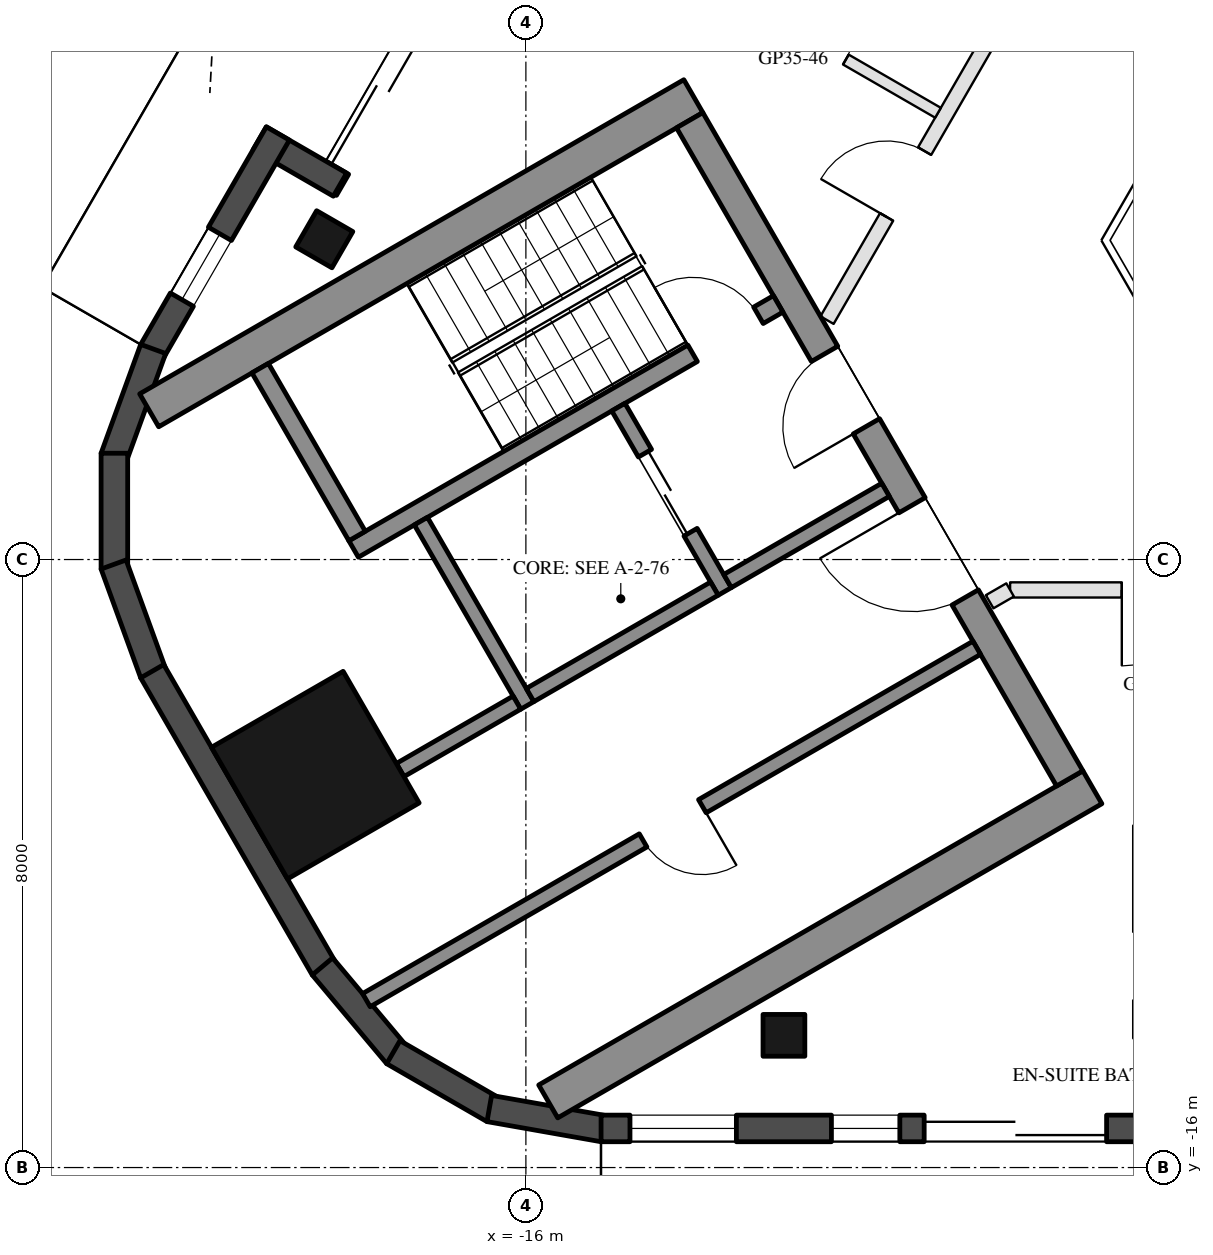
"""IFC4 building model, lengths in metres.
Left out: names, types, materials, properties, quantities, classifications, styles, units other than length and angle.
Written with IfcOpenShell. Run it as: python <this file> out.ifc"""

import sys

from ifc_helpers import new_model, si_unit, direction, frame, frame_2d, origin, origin_2d, place, context, subcontext, project, spatial, rectangle, hollow_rectangle, extrude, boolean, halfspace, element, fill, save


model = new_model("IFC4")
c1 = context("Model", 3, precision=1e-05, world=origin(), true_north=direction((0.0, 1.0)))
c2 = subcontext(c1, "Body", "Model", "MODEL_VIEW")
j1 = project(units=[si_unit("LENGTHUNIT", "METRE"), si_unit("PLANEANGLEUNIT", "RADIAN")], contexts=[c1])
p1 = place(None, origin())
s1 = spatial("IfcSite", under=j1, at=p1, CompositionType="ELEMENT")
p2 = place(p1, origin())
s2 = spatial("IfcBuilding", under=s1, at=p2, CompositionType="ELEMENT")
p3 = place(p2, frame((0.0, 0.0, 324.4)))
s3 = spatial("IfcBuildingStorey", under=s2, at=p3, CompositionType="ELEMENT", Elevation=324.4)
for number, where, z_axis, x_axis in (
    (1, (-12.605, -14.26, 0.0), (0.0, 0.0, 1.0), (-1.0, 0.0, 0.0)),
    (2, (-18.652, -3.786, 0.0), (0.0, 0.0, 1.0), (0.5, 0.866, 0.0)),
):
    element("IfcColumn", number, at=place(p3, frame(where, z_axis=z_axis, x_axis=x_axis)), inside=s3, PredefinedType="COLUMN", context=c2, shape_type="SweptSolid", body=[
        boolean("DIFFERENCE", boolean("DIFFERENCE", extrude(hollow_rectangle(XDim=0.55, YDim=0.55, WallThickness=0.025, at=origin_2d()), origin(), (0.0, 0.0, 1.0), 3.7), halfspace(frame((0.0, 0.0, 0.04), z_axis=(0.0, 0.0, 1.0), x_axis=(1.0, 0.0, 0.0)), True)), halfspace(frame((0.0, 0.0, 3.66), z_axis=(0.0, 0.0, 1.0), x_axis=(1.0, 0.0, 0.0)), False)),
    ])
p4 = place(p3, frame((-18.77, -10.837, 0.0), z_axis=(0.0, 0.0, 1.0), x_axis=(-0.5, 0.866025403784, 0.0)))
e3 = element("IfcColumn", 3, at=p4, inside=s3, PredefinedType="COLUMN", context=c2, shape_type="SweptSolid", body=[
    boolean("DIFFERENCE", boolean("DIFFERENCE", extrude(hollow_rectangle(XDim=2.0, YDim=2.0, WallThickness=0.05, at=origin_2d()), origin(), (0.0, 0.0, 1.0), 3.7), halfspace(frame((0.0, 0.0, 0.113), z_axis=(0.0, 0.0, 1.0), x_axis=(1.0, 0.0, 0.0)), True)), halfspace(frame((0.0, 0.0, 3.587), z_axis=(0.0, 0.0, 1.0), x_axis=(1.0, 0.0, 0.0)), False)),
])
p5 = place(p3, frame((-16.073, 1.333, 0.0), z_axis=(0.0, 0.0, 1.0), x_axis=(-0.499999159329, -0.866025889145, 0.0)))
e4 = element("IfcWall", 4, at=p5, inside=s3, PredefinedType="SOLIDWALL", context=c2, shape_type="SweptSolid", body=[
    extrude(rectangle(XDim=5.143, YDim=0.35, at=frame_2d((2.571, 0.0))), origin(), (0.0, 0.0, 1.0), 3.55),
])
p6 = place(p5, frame((2.422, 0.0, 0.0)))
e5 = element("IfcOpeningElement", 5, at=p6, cuts=e4, PredefinedType="OPENING", context=c2, shape_type="SweptSolid", body=[
    extrude(rectangle(XDim=2.4, YDim=2.4, at=frame_2d((1.2, 1.2))), frame((0.0, 0.185, 0.0), z_axis=(0.0, -1.0, 0.0), x_axis=(1.0, 0.0, 0.0)), (0.0, 0.0, 1.0), 0.37),
])
p7 = place(p5, frame((0.32, 0.0, 0.3)))
e6 = element("IfcOpeningElement", 6, at=p7, cuts=e4, PredefinedType="OPENING", context=c2, shape_type="SweptSolid", body=[
    extrude(rectangle(XDim=1.8, YDim=2.65, at=frame_2d((0.9, 1.325))), frame((0.0, 0.185, 0.0), z_axis=(0.0, -1.0, 0.0), x_axis=(1.0, 0.0, 0.0)), (0.0, 0.0, 1.0), 0.37),
])
p8 = place(p3, frame((-18.446, -3.068, 0.0), z_axis=(0.0, 0.0, 1.0), x_axis=(-0.866005645448, 0.500034220881, 0.0)))
e7 = element("IfcWall", 7, at=p8, inside=s3, PredefinedType="SOLIDWALL", context=c2, shape_type="SweptSolid", body=[
    extrude(rectangle(XDim=1.22, YDim=0.35, at=frame_2d((0.61, 0.0))), origin(), (0.0, 0.0, 1.0), 3.55),
])
p9 = place(p3, frame((-19.263, -2.394, 0.0), z_axis=(0.0, 0.0, 1.0), x_axis=(-0.500022895934, -0.866012184407, 0.0)))
e8 = element("IfcWall", 8, at=p9, inside=s3, PredefinedType="SOLIDWALL", context=c2, shape_type="SweptSolid", body=[
    extrude(rectangle(XDim=3.306, YDim=0.35, at=frame_2d((1.653, 0.0))), origin(), (0.0, 0.0, 1.0), 3.55),
])
p10 = place(p9, frame((1.525, 0.0, 0.3)))
e9 = element("IfcOpeningElement", 9, at=p10, cuts=e8, PredefinedType="OPENING", context=c2, shape_type="SweptSolid", body=[
    extrude(rectangle(XDim=1.0, YDim=2.65, at=frame_2d((0.5, 1.325))), frame((0.0, 0.185, 0.0), z_axis=(0.0, -1.0, 0.0), x_axis=(1.0, 0.0, 0.0)), (0.0, 0.0, 1.0), 0.37),
])
for number, where, z_axis, x_axis in (
    (10, (-20.903, -5.229, 0.0), (0.0, 0.0, 1.0), (-0.342, -0.94, 0.0)),
    (11, (-21.414, -6.602, 0.0), (0.0, 0.0, 1.0), (0.0, -1.0, 0.0)),
    (12, (-21.425, -8.065, 0.0), (0.0, 0.0, 1.0), (0.342, -0.94, 0.0)),
):
    element("IfcWall", number, at=place(p3, frame(where, z_axis=z_axis, x_axis=x_axis)), inside=s3, PredefinedType="SOLIDWALL", context=c2, shape_type="SweptSolid", body=[
        extrude(rectangle(XDim=1.524, YDim=0.35, at=frame_2d((0.762, 0.0))), origin(), (0.0, 0.0, 1.0), 3.55),
    ])
p11 = place(p3, frame((-20.916, -9.47, 0.0), z_axis=(0.0, 0.0, 1.0), x_axis=(0.500042384281, -0.866000931825, 0.0)))
e13 = element("IfcWall", 13, at=p11, inside=s3, PredefinedType="SOLIDWALL", context=c2, shape_type="SweptSolid", body=[
    extrude(rectangle(XDim=4.514, YDim=0.35, at=frame_2d((2.257, 0.0))), origin(), (0.0, 0.0, 1.0), 3.55),
])
p12 = place(p3, frame((-18.677, -13.354, 0.0), z_axis=(0.0, 0.0, 1.0), x_axis=(0.642812493629, -0.766023562323, 0.0)))
e14 = element("IfcWall", 14, at=p12, inside=s3, PredefinedType="SOLIDWALL", context=c2, shape_type="SweptSolid", body=[
    extrude(rectangle(XDim=1.524, YDim=0.35, at=frame_2d((0.762, 0.0))), origin(), (0.0, 0.0, 1.0), 3.55),
])
for number, where, z_axis, x_axis in (
    (15, (-17.744, -14.482, 0.0), (0.0, 0.0, 1.0), (0.866, -0.5, 0.0)),
    (16, (-16.481, -15.223, 0.0), (0.0, 0.0, 1.0), (0.985, -0.174, 0.0)),
):
    element("IfcWall", number, at=place(p3, frame(where, z_axis=z_axis, x_axis=x_axis)), inside=s3, PredefinedType="SOLIDWALL", context=c2, shape_type="SweptSolid", body=[
        extrude(rectangle(XDim=1.524, YDim=0.35, at=frame_2d((0.762, 0.0))), origin(), (0.0, 0.0, 1.0), 3.55),
    ])
p13 = place(p3, frame((-15.011, -15.485, 0.0), z_axis=(0.0, 0.0, 1.0), x_axis=(1.0, 0.0, 0.0)))
e17 = element("IfcWall", 17, at=p13, inside=s3, PredefinedType="SOLIDWALL", context=c2, shape_type="SweptSolid", body=[
    extrude(rectangle(XDim=9.608, YDim=0.35, at=frame_2d((4.804, 0.0))), origin(), (0.0, 0.0, 1.0), 3.55),
])
p14 = place(p13, frame((0.38, 0.0, 0.3)))
e18 = element("IfcOpeningElement", 18, at=p14, cuts=e17, PredefinedType="OPENING", context=c2, shape_type="SweptSolid", body=[
    extrude(rectangle(XDim=1.4, YDim=2.65, at=frame_2d((0.7, 1.325))), frame((0.0, 0.185, 0.0), z_axis=(0.0, -1.0, 0.0), x_axis=(1.0, 0.0, 0.0)), (0.0, 0.0, 1.0), 0.37),
])
p15 = place(p13, frame((4.251, 0.0, 0.0)))
e19 = element("IfcOpeningElement", 19, at=p15, cuts=e17, PredefinedType="OPENING", context=c2, shape_type="SweptSolid", body=[
    extrude(rectangle(XDim=2.4, YDim=2.4, at=frame_2d((1.2, 1.2))), frame((0.0, 0.185, 0.0), z_axis=(0.0, -1.0, 0.0), x_axis=(1.0, 0.0, 0.0)), (0.0, 0.0, 1.0), 0.37),
])
p16 = place(p13, frame((3.031, 0.0, 0.3)))
e20 = element("IfcOpeningElement", 20, at=p16, cuts=e17, PredefinedType="OPENING", context=c2, shape_type="SweptSolid", body=[
    extrude(rectangle(XDim=0.9, YDim=2.65, at=frame_2d((0.45, 1.325))), frame((0.0, 0.185, 0.0), z_axis=(0.0, -1.0, 0.0), x_axis=(1.0, 0.0, 0.0)), (0.0, 0.0, 1.0), 0.37),
])
for number, where, z_axis, x_axis in (
    (21, (-13.797, -1.903, 0.0), (0.0, 0.0, 1.0), (-0.866, -0.5, 0.0)),
    (22, (-8.547, -10.997, 0.0), (0.0, 0.0, 1.0), (-0.866, -0.5, 0.0)),
):
    element("IfcWall", number, at=place(p3, frame(where, z_axis=z_axis, x_axis=x_axis)), inside=s3, PredefinedType="SHEAR", context=c2, shape_type="SweptSolid", body=[
        extrude(rectangle(XDim=8.267, YDim=0.5, at=frame_2d((4.134, 0.0))), origin(), (0.0, 0.0, 1.0), 3.5),
    ])
p17 = place(p3, frame((-13.845, -2.22, 0.0), z_axis=(0.0, 0.0, 1.0), x_axis=(0.500004234368, -0.866022959057, 0.0)))
e23 = element("IfcWall", 23, at=p17, inside=s3, PredefinedType="SHEAR", context=c2, shape_type="SweptSolid", body=[
    extrude(rectangle(XDim=10.0, YDim=0.4, at=frame_2d((5.0, 0.0))), origin(), (0.0, 0.0, 1.0), 3.5),
])
p18 = place(p17, frame((3.55, 0.0, 0.0)))
e24 = element("IfcOpeningElement", 24, at=p18, cuts=e23, PredefinedType="OPENING", context=c2, shape_type="SweptSolid", body=[
    extrude(rectangle(XDim=1.1, YDim=2.1, at=frame_2d((0.55, 1.05))), frame((0.0, 0.21, 0.0), z_axis=(0.0, -1.0, 0.0), x_axis=(1.0, 0.0, 0.0)), (0.0, 0.0, 1.0), 0.42),
])
p19 = place(p17, frame((5.85, 0.0, 0.0)))
e25 = element("IfcOpeningElement", 25, at=p19, cuts=e23, PredefinedType="OPENING", context=c2, shape_type="SweptSolid", body=[
    extrude(rectangle(XDim=1.4, YDim=2.1, at=frame_2d((0.7, 1.05))), frame((0.0, 0.21, 0.0), z_axis=(0.0, -1.0, 0.0), x_axis=(1.0, 0.0, 0.0)), (0.0, 0.0, 1.0), 0.42),
])
p20 = place(p3, frame((-12.681, -4.636, 0.0), z_axis=(0.0, 0.0, 1.0), x_axis=(-0.866021702275, -0.500006411147, 0.0)))
e26 = element("IfcWall", 26, at=p20, inside=s3, PredefinedType="SHEAR", context=c2, shape_type="SweptSolid", body=[
    extrude(rectangle(XDim=6.45, YDim=0.25, at=frame_2d((3.225, 0.0))), origin(), (0.0, 0.0, 1.0), 3.5),
])
p21 = place(p20, frame((0.3, 0.0, 0.0)))
e27 = element("IfcOpeningElement", 27, at=p21, cuts=e26, PredefinedType="OPENING", context=c2, shape_type="SweptSolid", body=[
    extrude(rectangle(XDim=1.0, YDim=2.1, at=frame_2d((0.5, 1.05))), frame((0.0, 0.135, 0.0), z_axis=(0.0, -1.0, 0.0), x_axis=(1.0, 0.0, 0.0)), (0.0, 0.0, 1.0), 0.27),
])
p22 = place(p3, frame((-19.496, -5.482, 0.0), z_axis=(0.0, 0.0, 1.0), x_axis=(0.499990435942, -0.866030925526, 0.0)))
e28 = element("IfcWall", 28, at=p22, inside=s3, PredefinedType="SHEAR", context=c2, shape_type="SweptSolid", body=[
    extrude(rectangle(XDim=2.55, YDim=0.25, at=frame_2d((1.275, 0.0))), origin(), (0.0, 0.0, 1.0), 3.5),
])
p23 = place(p3, frame((-17.381, -7.495, 0.0), z_axis=(0.0, 0.0, 1.0), x_axis=(0.500011755427, -0.866018616679, 0.0)))
e29 = element("IfcWall", 29, at=p23, inside=s3, PredefinedType="SHEAR", context=c2, shape_type="SweptSolid", body=[
    extrude(rectangle(XDim=2.8, YDim=0.2, at=frame_2d((1.4, 0.0))), origin(), (0.0, 0.0, 1.0), 3.5),
])
p24 = place(p3, frame((-14.783, -5.995, 0.0), z_axis=(0.0, 0.0, 1.0), x_axis=(0.49994636267, -0.866056369097, 0.0)))
e30 = element("IfcWall", 30, at=p24, inside=s3, PredefinedType="SHEAR", context=c2, shape_type="SweptSolid", body=[
    extrude(rectangle(XDim=2.8, YDim=0.2, at=frame_2d((1.4, 0.0))), origin(), (0.0, 0.0, 1.0), 3.5),
])
p25 = place(p24, frame((0.7, 0.0, 0.0)))
e31 = element("IfcOpeningElement", 31, at=p25, cuts=e30, PredefinedType="OPENING", context=c2, shape_type="SweptSolid", body=[
    extrude(rectangle(XDim=1.2, YDim=2.1, at=frame_2d((0.6, 1.05))), frame((0.0, 0.11, 0.0), z_axis=(0.0, -1.0, 0.0), x_axis=(1.0, 0.0, 0.0)), (0.0, 0.0, 1.0), 0.22),
])
p26 = place(p3, frame((-13.52, -8.383, 0.0), z_axis=(0.0, 0.0, 1.0), x_axis=(-0.866034573852, -0.49998411664, 0.0)))
e32 = element("IfcWall", 32, at=p26, inside=s3, PredefinedType="SHEAR", context=c2, shape_type="SweptSolid", body=[
    extrude(rectangle(XDim=2.8, YDim=0.2, at=frame_2d((1.4, 0.0))), origin(), (0.0, 0.0, 1.0), 3.5),
])
p27 = place(p3, frame((-11.268, -7.083, 0.0), z_axis=(0.0, 0.0, 1.0), x_axis=(-0.866050077142, -0.499957262057, 0.0)))
e33 = element("IfcWall", 33, at=p27, inside=s3, PredefinedType="SHEAR", context=c2, shape_type="SweptSolid", body=[
    extrude(rectangle(XDim=2.4, YDim=0.2, at=frame_2d((1.2, 0.0))), origin(), (0.0, 0.0, 1.0), 3.5),
])
p28 = place(p3, frame((-10.068, -9.162, 0.0), z_axis=(0.0, 0.0, 1.0), x_axis=(-0.866027741594, -0.499995950774, 0.0)))
e34 = element("IfcWall", 34, at=p28, inside=s3, PredefinedType="SHEAR", context=c2, shape_type="SweptSolid", body=[
    extrude(rectangle(XDim=9.272, YDim=0.2, at=frame_2d((4.636, 0.0))), origin(), (0.0, 0.0, 1.0), 3.5),
])
p29 = place(p28, frame((4.169, 0.0, 0.0)))
e35 = element("IfcOpeningElement", 35, at=p29, cuts=e34, PredefinedType="OPENING", context=c2, shape_type="SweptSolid", body=[
    extrude(rectangle(XDim=0.9, YDim=2.1, at=frame_2d((0.45, 1.05))), frame((0.0, 0.11, 0.0), z_axis=(0.0, -1.0, 0.0), x_axis=(1.0, 0.0, 0.0)), (0.0, 0.0, 1.0), 0.22),
])
p30 = place(p3, frame((-16.118, -9.883, 0.0), z_axis=(0.0, 0.0, 1.0), x_axis=(-0.86600680221, -0.500032217487, 0.0)))
e36 = element("IfcWall", 36, at=p30, inside=s3, PredefinedType="SHEAR", context=c2, shape_type="SweptSolid", body=[
    extrude(rectangle(XDim=1.774, YDim=0.2, at=frame_2d((0.887, 0.0))), origin(), (0.0, 0.0, 1.0), 3.5),
])
p31 = place(p3, frame((-5.69, -8.4, 0.0), z_axis=(0.0, 0.0, 1.0), x_axis=(-1.0, 0.0, 0.0)))
e37 = element("IfcWall", 37, at=p31, inside=s3, PredefinedType="PARTITIONING", context=c2, shape_type="SweptSolid", body=[
    extrude(rectangle(XDim=3.939, YDim=0.2, at=frame_2d((1.969, 0.0))), origin(), (0.0, 0.0, 1.0), 3.15),
])
p32 = place(p31, frame((1.469, 0.0, 0.0)))
e38 = element("IfcOpeningElement", 38, at=p32, cuts=e37, PredefinedType="OPENING", context=c2, shape_type="SweptSolid", body=[
    extrude(rectangle(XDim=1.0, YDim=2.1, at=frame_2d((0.5, 1.05))), frame((0.0, 0.11, 0.0), z_axis=(0.0, -1.0, 0.0), x_axis=(1.0, 0.0, 0.0)), (0.0, 0.0, 1.0), 0.22),
])
p33 = place(p3, frame((-9.629, -8.4, 0.0), z_axis=(0.0, 0.0, 1.0), x_axis=(-0.865963302823, -0.500107546598, 0.0)))
e39 = element("IfcWall", 39, at=p33, inside=s3, PredefinedType="PARTITIONING", context=c2, shape_type="SweptSolid", body=[
    extrude(rectangle(XDim=0.311, YDim=0.2, at=frame_2d((0.156, 0.0))), origin(), (0.0, 0.0, 1.0), 3.55),
])
p34 = place(p3, frame((-12.038, -4.85, 0.0), z_axis=(0.0, 0.0, 1.0), x_axis=(0.500003693016, 0.86602327161, 0.0)))
e40 = element("IfcWall", 40, at=p34, inside=s3, PredefinedType="PARTITIONING", context=c2, shape_type="SweptSolid", body=[
    extrude(rectangle(XDim=5.035, YDim=0.2, at=frame_2d((2.517, 0.0))), origin(), (0.0, 0.0, 1.0), 3.15),
])
p35 = place(p34, frame((1.568, 0.0, 0.0)))
e41 = element("IfcOpeningElement", 41, at=p35, cuts=e40, PredefinedType="OPENING", context=c2, shape_type="SweptSolid", body=[
    extrude(rectangle(XDim=1.0, YDim=2.1, at=frame_2d((0.5, 1.05))), frame((0.0, 0.11, 0.0), z_axis=(0.0, -1.0, 0.0), x_axis=(1.0, 0.0, 0.0)), (0.0, 0.0, 1.0), 0.22),
])
p36 = place(p3, frame((-13.003, -0.722, 0.0), z_axis=(0.0, 0.0, 1.0), x_axis=(0.866056369097, -0.49994636267, 0.0)))
e42 = element("IfcWall", 42, at=p36, inside=s3, PredefinedType="PARTITIONING", context=c2, shape_type="SweptSolid", body=[
    extrude(rectangle(XDim=2.8, YDim=0.15, at=frame_2d((1.4, 0.0))), origin(), (0.0, 0.0, 1.0), 3.55),
])
p37 = place(p36, frame((0.5, 0.0, 0.0)))
e43 = element("IfcOpeningElement", 43, at=p37, cuts=e42, PredefinedType="OPENING", context=c2, shape_type="SweptSolid", body=[
    extrude(rectangle(XDim=0.9, YDim=2.1, at=frame_2d((0.45, 1.05))), frame((0.0, 0.085, 0.0), z_axis=(0.0, -1.0, 0.0), x_axis=(1.0, 0.0, 0.0)), (0.0, 0.0, 1.0), 0.17),
])
p38 = place(p14, origin())
e44 = element("IfcWindow", 44, at=p38, inside=s3, PartitioningType="SINGLE_PANEL", PredefinedType="WINDOW", context=c2, shape_type="SweptSolid", body=[
    extrude(rectangle(XDim=1.4, YDim=2.65, at=frame_2d((0.7, 1.325))), frame((0.0, 0.03, 0.0), z_axis=(0.0, -1.0, 0.0), x_axis=(1.0, 0.0, 0.0)), (0.0, 0.0, 1.0), 0.06),
])
fill(e18, e44)
p39 = place(p15, frame((2.4, 0.0, 0.0), z_axis=(0.0, 0.0, 1.0), x_axis=(-1.0, 0.0, 0.0)))
e45 = element("IfcDoor", 45, at=p39, inside=s3, OperationType="SLIDING_TO_LEFT", PredefinedType="DOOR", context=c2, shape_type="SweptSolid", body=[
    extrude(rectangle(XDim=2.4, YDim=2.4, at=frame_2d((1.2, 1.2))), frame((0.0, 0.025, 0.0), z_axis=(0.0, -1.0, 0.0), x_axis=(1.0, 0.0, 0.0)), (0.0, 0.0, 1.0), 0.05),
])
fill(e19, e45)
p40 = place(p16, origin())
e46 = element("IfcWindow", 46, at=p40, inside=s3, PartitioningType="SINGLE_PANEL", PredefinedType="WINDOW", context=c2, shape_type="SweptSolid", body=[
    extrude(rectangle(XDim=0.9, YDim=2.65, at=frame_2d((0.45, 1.325))), frame((0.0, 0.03, 0.0), z_axis=(0.0, -1.0, 0.0), x_axis=(1.0, 0.0, 0.0)), (0.0, 0.0, 1.0), 0.06),
])
fill(e20, e46)
p41 = place(p6, frame((2.4, 0.0, 0.0), z_axis=(0.0, 0.0, 1.0), x_axis=(-1.0, 0.0, 0.0)))
e47 = element("IfcDoor", 47, at=p41, inside=s3, OperationType="SLIDING_TO_LEFT", PredefinedType="DOOR", context=c2, shape_type="SweptSolid", body=[
    extrude(rectangle(XDim=2.4, YDim=2.4, at=frame_2d((1.2, 1.2))), frame((0.0, 0.025, 0.0), z_axis=(0.0, -1.0, 0.0), x_axis=(1.0, 0.0, 0.0)), (0.0, 0.0, 1.0), 0.05),
])
fill(e5, e47)
p42 = place(p10, origin())
e48 = element("IfcWindow", 48, at=p42, inside=s3, PartitioningType="SINGLE_PANEL", PredefinedType="WINDOW", context=c2, shape_type="SweptSolid", body=[
    extrude(rectangle(XDim=1.0, YDim=2.65, at=frame_2d((0.5, 1.325))), frame((0.0, 0.03, 0.0), z_axis=(0.0, -1.0, 0.0), x_axis=(1.0, 0.0, 0.0)), (0.0, 0.0, 1.0), 0.06),
])
fill(e9, e48)
p43 = place(p25, origin())
e49 = element("IfcDoor", 49, at=p43, inside=s3, OperationType="DOUBLE_DOOR_SLIDING", PredefinedType="DOOR", context=c2, shape_type="SweptSolid", body=[
    extrude(rectangle(XDim=1.2, YDim=2.1, at=frame_2d((0.6, 1.05))), frame((0.0, 0.025, 0.0), z_axis=(0.0, -1.0, 0.0), x_axis=(1.0, 0.0, 0.0)), (0.0, 0.0, 1.0), 0.05),
])
fill(e31, e49)
p44 = place(p29, origin())
e50 = element("IfcDoor", 50, at=p44, inside=s3, OperationType="SINGLE_SWING_LEFT", PredefinedType="DOOR", context=c2, shape_type="SweptSolid", body=[
    extrude(rectangle(XDim=0.9, YDim=2.1, at=frame_2d((0.45, 1.05))), frame((0.0, 0.025, 0.0), z_axis=(0.0, -1.0, 0.0), x_axis=(1.0, 0.0, 0.0)), (0.0, 0.0, 1.0), 0.05),
])
fill(e35, e50)
p45 = place(p18, frame((1.1, 0.0, 0.0), z_axis=(0.0, 0.0, 1.0), x_axis=(-1.0, 0.0, 0.0)))
e51 = element("IfcDoor", 51, at=p45, inside=s3, OperationType="SINGLE_SWING_LEFT", PredefinedType="DOOR", context=c2, shape_type="SweptSolid", body=[
    extrude(rectangle(XDim=1.1, YDim=2.1, at=frame_2d((0.55, 1.05))), frame((0.0, 0.025, 0.0), z_axis=(0.0, -1.0, 0.0), x_axis=(1.0, 0.0, 0.0)), (0.0, 0.0, 1.0), 0.05),
])
fill(e24, e51)
p46 = place(p19, frame((1.4, 0.0, 0.0), z_axis=(0.0, 0.0, 1.0), x_axis=(-1.0, 0.0, 0.0)))
e52 = element("IfcDoor", 52, at=p46, inside=s3, OperationType="DOUBLE_DOOR_SINGLE_SWING", PredefinedType="DOOR", context=c2, shape_type="SweptSolid", body=[
    extrude(rectangle(XDim=1.4, YDim=2.1, at=frame_2d((0.7, 1.05))), frame((0.0, 0.025, 0.0), z_axis=(0.0, -1.0, 0.0), x_axis=(1.0, 0.0, 0.0)), (0.0, 0.0, 1.0), 0.05),
])
fill(e25, e52)
p47 = place(p21, frame((1.0, 0.0, 0.0), z_axis=(0.0, 0.0, 1.0), x_axis=(-1.0, 0.0, 0.0)))
e53 = element("IfcDoor", 53, at=p47, inside=s3, OperationType="SINGLE_SWING_LEFT", PredefinedType="DOOR", context=c2, shape_type="SweptSolid", body=[
    extrude(rectangle(XDim=1.0, YDim=2.1, at=frame_2d((0.5, 1.05))), frame((0.0, 0.025, 0.0), z_axis=(0.0, -1.0, 0.0), x_axis=(1.0, 0.0, 0.0)), (0.0, 0.0, 1.0), 0.05),
])
fill(e27, e53)
p48 = place(p32, origin())
e54 = element("IfcDoor", 54, at=p48, inside=s3, OperationType="SINGLE_SWING_RIGHT", PredefinedType="DOOR", context=c2, shape_type="SweptSolid", body=[
    extrude(rectangle(XDim=1.0, YDim=2.1, at=frame_2d((0.5, 1.05))), frame((0.0, 0.025, 0.0), z_axis=(0.0, -1.0, 0.0), x_axis=(1.0, 0.0, 0.0)), (0.0, 0.0, 1.0), 0.05),
])
fill(e38, e54)
p49 = place(p37, origin())
e55 = element("IfcDoor", 55, at=p49, inside=s3, OperationType="SINGLE_SWING_LEFT", PredefinedType="DOOR", context=c2, shape_type="SweptSolid", body=[
    extrude(rectangle(XDim=0.9, YDim=2.1, at=frame_2d((0.45, 1.05))), frame((0.0, 0.025, 0.0), z_axis=(0.0, -1.0, 0.0), x_axis=(1.0, 0.0, 0.0)), (0.0, 0.0, 1.0), 0.05),
])
fill(e43, e55)
p50 = place(p35, origin())
e56 = element("IfcDoor", 56, at=p50, inside=s3, OperationType="SINGLE_SWING_LEFT", PredefinedType="DOOR", context=c2, shape_type="SweptSolid", body=[
    extrude(rectangle(XDim=1.0, YDim=2.1, at=frame_2d((0.5, 1.05))), frame((0.0, 0.025, 0.0), z_axis=(0.0, -1.0, 0.0), x_axis=(1.0, 0.0, 0.0)), (0.0, 0.0, 1.0), 0.05),
])
fill(e41, e56)
save(model, sys.argv[1])
